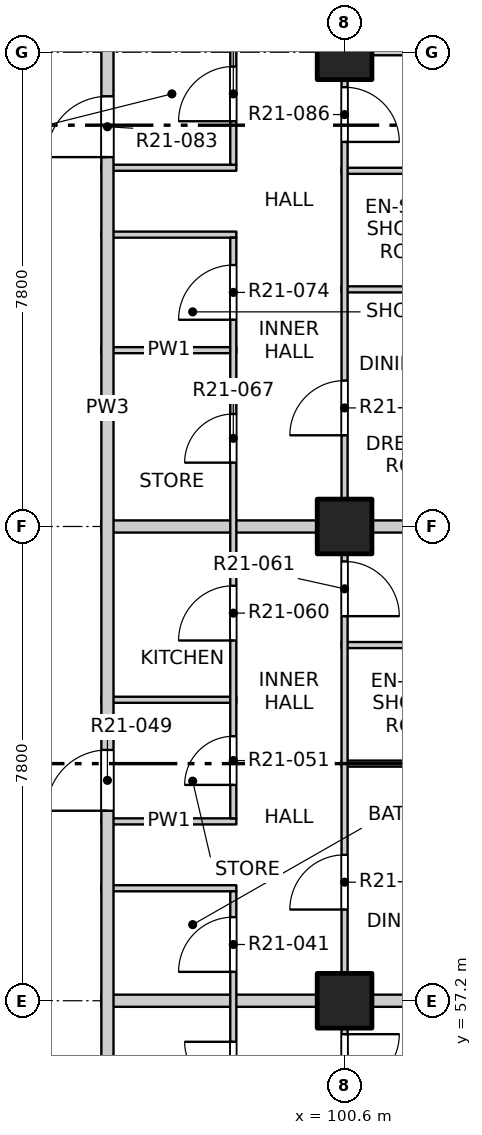
"""IFC4 building model, lengths in metres.
Left out: names, types, materials, properties, quantities, classifications, styles, units other than length and angle.
Written with IfcOpenShell. Run it as: python <this file> out.ifc"""

import sys

from ifc_helpers import new_model, si_unit, direction, frame, frame_2d, origin, origin_2d, place, context, subcontext, project, spatial, rectangle, extrude, element, fill, save


model = new_model("IFC4")
c1 = context("Model", 3, precision=1e-05, world=origin(), true_north=direction((0.0, 1.0)))
c2 = subcontext(c1, "Body", "Model", "MODEL_VIEW")
j1 = project(units=[si_unit("LENGTHUNIT", "METRE"), si_unit("PLANEANGLEUNIT", "RADIAN")], contexts=[c1])
p1 = place(None, origin())
s1 = spatial("IfcSite", under=j1, at=p1, CompositionType="ELEMENT")
p2 = place(p1, origin())
s2 = spatial("IfcBuilding", under=s1, at=p2, CompositionType="ELEMENT")
p3 = place(p2, frame((0.0, 0.0, 214.3)))
s3 = spatial("IfcBuildingStorey", under=s2, at=p3, CompositionType="ELEMENT", Elevation=214.3)
for number, where, z_axis, x_axis in (
    (1, (100.6, 57.2, -0.25), (0.0, 0.0, 1.0), (1.0, 0.0, 0.0)),
    (2, (100.6, 65.0, -0.25), (0.0, 0.0, 1.0), (1.0, 0.0, 0.0)),
    (3, (100.6, 72.8, -0.25), (0.0, 0.0, 1.0), (1.0, 0.0, 0.0)),
):
    element("IfcColumn", number, at=place(p3, frame(where, z_axis=z_axis, x_axis=x_axis)), inside=s3, PredefinedType="COLUMN", context=c2, shape_type="SweptSolid", body=[
        extrude(rectangle(XDim=0.9, YDim=0.9, at=origin_2d()), origin(), (0.0, 0.0, 1.0), 3.4),
    ])
p4 = place(p3, frame((96.6, 57.2, 0.0), z_axis=(0.0, 0.0, 1.0), x_axis=(1.0, 0.0, 0.0)))
e4 = element("IfcWall", 4, at=p4, inside=s3, PredefinedType="PARTITIONING", context=c2, shape_type="SweptSolid", body=[
    extrude(rectangle(XDim=11.5, YDim=0.2, at=frame_2d((5.75, 0.0))), origin(), (0.0, 0.0, 1.0), 3.15),
])
for number, where, z_axis, x_axis in (
    (5, (96.6, 59.05, 0.0), (0.0, 0.0, 1.0), (1.0, 0.0, 0.0)),
    (6, (96.6, 60.15, 0.0), (0.0, 0.0, 1.0), (1.0, 0.0, 0.0)),
):
    element("IfcWall", number, at=place(p3, frame(where, z_axis=z_axis, x_axis=x_axis)), inside=s3, PredefinedType="PARTITIONING", context=c2, shape_type="SweptSolid", body=[
        extrude(rectangle(XDim=2.22, YDim=0.1, at=frame_2d((1.11, 0.0))), origin(), (0.0, 0.0, 1.0), 3.15),
    ])
p5 = place(p3, frame((100.55, 61.1, 0.0), z_axis=(0.0, 0.0, 1.0), x_axis=(1.0, 0.0, 0.0)))
e7 = element("IfcWall", 7, at=p5, inside=s3, PredefinedType="PARTITIONING", context=c2, shape_type="SweptSolid", body=[
    extrude(rectangle(XDim=7.55, YDim=0.1, at=frame_2d((3.775, 0.0))), origin(), (0.0, 0.0, 1.0), 2.55),
])
p6 = place(p3, frame((96.6, 62.15, 0.0), z_axis=(0.0, 0.0, 1.0), x_axis=(1.0, 0.0, 0.0)))
e8 = element("IfcWall", 8, at=p6, inside=s3, PredefinedType="PARTITIONING", context=c2, shape_type="SweptSolid", body=[
    extrude(rectangle(XDim=2.22, YDim=0.1, at=frame_2d((1.11, 0.0))), origin(), (0.0, 0.0, 1.0), 3.15),
])
p7 = place(p3, frame((100.55, 63.05, 0.0), z_axis=(0.0, 0.0, 1.0), x_axis=(1.0, 0.0, 0.0)))
e9 = element("IfcWall", 9, at=p7, inside=s3, PredefinedType="PARTITIONING", context=c2, shape_type="SweptSolid", body=[
    extrude(rectangle(XDim=3.7, YDim=0.1, at=frame_2d((1.85, 0.0))), origin(), (0.0, 0.0, 1.0), 3.15),
])
p8 = place(p3, frame((96.6, 65.0, 0.0), z_axis=(0.0, 0.0, 1.0), x_axis=(1.0, 0.0, 0.0)))
e10 = element("IfcWall", 10, at=p8, inside=s3, PredefinedType="PARTITIONING", context=c2, shape_type="SweptSolid", body=[
    extrude(rectangle(XDim=11.5, YDim=0.2, at=frame_2d((5.75, 0.0))), origin(), (0.0, 0.0, 1.0), 3.15),
])
p9 = place(p3, frame((96.6, 67.9, 0.0), z_axis=(0.0, 0.0, 1.0), x_axis=(1.0, 0.0, 0.0)))
e11 = element("IfcWall", 11, at=p9, inside=s3, PredefinedType="PARTITIONING", context=c2, shape_type="SweptSolid", body=[
    extrude(rectangle(XDim=2.22, YDim=0.1, at=frame_2d((1.11, 0.0))), origin(), (0.0, 0.0, 1.0), 3.15),
])
p10 = place(p3, frame((100.55, 68.9, 0.0), z_axis=(0.0, 0.0, 1.0), x_axis=(1.0, 0.0, 0.0)))
e12 = element("IfcWall", 12, at=p10, inside=s3, PredefinedType="PARTITIONING", context=c2, shape_type="SweptSolid", body=[
    extrude(rectangle(XDim=7.55, YDim=0.1, at=frame_2d((3.775, 0.0))), origin(), (0.0, 0.0, 1.0), 2.55),
])
p11 = place(p3, frame((96.6, 69.8, 0.0), z_axis=(0.0, 0.0, 1.0), x_axis=(1.0, 0.0, 0.0)))
e13 = element("IfcWall", 13, at=p11, inside=s3, PredefinedType="PARTITIONING", context=c2, shape_type="SweptSolid", body=[
    extrude(rectangle(XDim=2.22, YDim=0.1, at=frame_2d((1.11, 0.0))), origin(), (0.0, 0.0, 1.0), 3.15),
])
p12 = place(p3, frame((100.55, 70.85, 0.0), z_axis=(0.0, 0.0, 1.0), x_axis=(1.0, 0.0, 0.0)))
e14 = element("IfcWall", 14, at=p12, inside=s3, PredefinedType="PARTITIONING", context=c2, shape_type="SweptSolid", body=[
    extrude(rectangle(XDim=3.4, YDim=0.1, at=frame_2d((1.7, 0.0))), origin(), (0.0, 0.0, 1.0), 3.15),
])
p13 = place(p3, frame((96.6, 70.9, 0.0), z_axis=(0.0, 0.0, 1.0), x_axis=(1.0, 0.0, 0.0)))
e15 = element("IfcWall", 15, at=p13, inside=s3, PredefinedType="PARTITIONING", context=c2, shape_type="SweptSolid", body=[
    extrude(rectangle(XDim=2.22, YDim=0.1, at=frame_2d((1.11, 0.0))), origin(), (0.0, 0.0, 1.0), 3.15),
])
p14 = place(p3, frame((100.55, 72.8, 0.0), z_axis=(0.0, 0.0, 1.0), x_axis=(1.0, 0.0, 0.0)))
e16 = element("IfcWall", 16, at=p14, inside=s3, PredefinedType="PARTITIONING", context=c2, shape_type="SweptSolid", body=[
    extrude(rectangle(XDim=7.55, YDim=0.1, at=frame_2d((3.775, 0.0))), origin(), (0.0, 0.0, 1.0), 3.15),
])
p15 = place(p3, frame((96.7, 49.5, 0.0), z_axis=(0.0, 0.0, 1.0), x_axis=(0.0, 1.0, 0.0)))
e17 = element("IfcWall", 17, at=p15, inside=s3, PredefinedType="PARTITIONING", context=c2, shape_type="SweptSolid", body=[
    extrude(rectangle(XDim=34.9, YDim=0.2, at=frame_2d((17.45, 0.0))), origin(), (0.0, 0.0, 1.0), 3.15),
])
p16 = place(p15, frame((3.275, 0.0, 0.0)))
e18 = element("IfcOpeningElement", 18, at=p16, cuts=e17, PredefinedType="OPENING", context=c2, shape_type="SweptSolid", body=[
    extrude(rectangle(XDim=1.0, YDim=2.1, at=frame_2d((0.5, 1.05))), frame((0.0, 0.11, 0.0), z_axis=(0.0, -1.0, 0.0), x_axis=(1.0, 0.0, 0.0)), (0.0, 0.0, 1.0), 0.22),
])
p17 = place(p15, frame((10.825, 0.0, 0.0)))
e19 = element("IfcOpeningElement", 19, at=p17, cuts=e17, PredefinedType="OPENING", context=c2, shape_type="SweptSolid", body=[
    extrude(rectangle(XDim=1.0, YDim=2.1, at=frame_2d((0.5, 1.05))), frame((0.0, 0.11, 0.0), z_axis=(0.0, -1.0, 0.0), x_axis=(1.0, 0.0, 0.0)), (0.0, 0.0, 1.0), 0.22),
])
p18 = place(p15, frame((21.575, 0.0, 0.0)))
e20 = element("IfcOpeningElement", 20, at=p18, cuts=e17, PredefinedType="OPENING", context=c2, shape_type="SweptSolid", body=[
    extrude(rectangle(XDim=1.0, YDim=2.1, at=frame_2d((0.5, 1.05))), frame((0.0, 0.11, 0.0), z_axis=(0.0, -1.0, 0.0), x_axis=(1.0, 0.0, 0.0)), (0.0, 0.0, 1.0), 0.22),
])
p19 = place(p15, frame((30.575, 0.0, 0.0)))
e21 = element("IfcOpeningElement", 21, at=p19, cuts=e17, PredefinedType="OPENING", context=c2, shape_type="SweptSolid", body=[
    extrude(rectangle(XDim=1.0, YDim=2.1, at=frame_2d((0.5, 1.05))), frame((0.0, 0.11, 0.0), z_axis=(0.0, -1.0, 0.0), x_axis=(1.0, 0.0, 0.0)), (0.0, 0.0, 1.0), 0.22),
])
p20 = place(p3, frame((98.77, 55.1, 0.0), z_axis=(0.0, 0.0, 1.0), x_axis=(0.0, 1.0, 0.0)))
e22 = element("IfcWall", 22, at=p20, inside=s3, PredefinedType="PARTITIONING", context=c2, shape_type="SweptSolid", body=[
    extrude(rectangle(XDim=3.9, YDim=0.1, at=frame_2d((1.95, 0.0))), origin(), (0.0, 0.0, 1.0), 3.15),
])
p21 = place(p20, frame((0.625, 0.0, 0.0)))
e23 = element("IfcOpeningElement", 23, at=p21, cuts=e22, PredefinedType="OPENING", context=c2, shape_type="SweptSolid", body=[
    extrude(rectangle(XDim=0.8, YDim=2.1, at=frame_2d((0.4, 1.05))), frame((0.0, 0.06, 0.0), z_axis=(0.0, -1.0, 0.0), x_axis=(1.0, 0.0, 0.0)), (0.0, 0.0, 1.0), 0.12),
])
p22 = place(p20, frame((2.575, 0.0, 0.0)))
e24 = element("IfcOpeningElement", 24, at=p22, cuts=e22, PredefinedType="OPENING", context=c2, shape_type="SweptSolid", body=[
    extrude(rectangle(XDim=0.9, YDim=2.1, at=frame_2d((0.45, 1.05))), frame((0.0, 0.06, 0.0), z_axis=(0.0, -1.0, 0.0), x_axis=(1.0, 0.0, 0.0)), (0.0, 0.0, 1.0), 0.12),
])
p23 = place(p3, frame((98.77, 60.2, 0.0), z_axis=(0.0, 0.0, 1.0), x_axis=(0.0, 1.0, 0.0)))
e25 = element("IfcWall", 25, at=p23, inside=s3, PredefinedType="PARTITIONING", context=c2, shape_type="SweptSolid", body=[
    extrude(rectangle(XDim=9.55, YDim=0.1, at=frame_2d((4.775, 0.0))), origin(), (0.0, 0.0, 1.0), 3.15),
])
p24 = place(p23, frame((0.55, 0.0, 0.0)))
e26 = element("IfcOpeningElement", 26, at=p24, cuts=e25, PredefinedType="OPENING", context=c2, shape_type="SweptSolid", body=[
    extrude(rectangle(XDim=0.8, YDim=2.1, at=frame_2d((0.4, 1.05))), frame((0.0, 0.06, 0.0), z_axis=(0.0, -1.0, 0.0), x_axis=(1.0, 0.0, 0.0)), (0.0, 0.0, 1.0), 0.12),
])
p25 = place(p23, frame((2.925, 0.0, 0.0)))
e27 = element("IfcOpeningElement", 27, at=p25, cuts=e25, PredefinedType="OPENING", context=c2, shape_type="SweptSolid", body=[
    extrude(rectangle(XDim=0.9, YDim=2.1, at=frame_2d((0.45, 1.05))), frame((0.0, 0.06, 0.0), z_axis=(0.0, -1.0, 0.0), x_axis=(1.0, 0.0, 0.0)), (0.0, 0.0, 1.0), 0.12),
])
p26 = place(p23, frame((5.85, 0.0, 0.0)))
e28 = element("IfcOpeningElement", 28, at=p26, cuts=e25, PredefinedType="OPENING", context=c2, shape_type="SweptSolid", body=[
    extrude(rectangle(XDim=0.8, YDim=2.1, at=frame_2d((0.4, 1.05))), frame((0.0, 0.06, 0.0), z_axis=(0.0, -1.0, 0.0), x_axis=(1.0, 0.0, 0.0)), (0.0, 0.0, 1.0), 0.12),
])
p27 = place(p23, frame((8.2, 0.0, 0.0)))
e29 = element("IfcOpeningElement", 29, at=p27, cuts=e25, PredefinedType="OPENING", context=c2, shape_type="SweptSolid", body=[
    extrude(rectangle(XDim=0.9, YDim=2.1, at=frame_2d((0.45, 1.05))), frame((0.0, 0.06, 0.0), z_axis=(0.0, -1.0, 0.0), x_axis=(1.0, 0.0, 0.0)), (0.0, 0.0, 1.0), 0.12),
])
p28 = place(p3, frame((98.77, 70.95, 0.0), z_axis=(0.0, 0.0, 1.0), x_axis=(0.0, 1.0, 0.0)))
e30 = element("IfcWall", 30, at=p28, inside=s3, PredefinedType="PARTITIONING", context=c2, shape_type="SweptSolid", body=[
    extrude(rectangle(XDim=7.8, YDim=0.1, at=frame_2d((3.9, 0.0))), origin(), (0.0, 0.0, 1.0), 3.15),
])
p29 = place(p28, frame((0.715, 0.0, 0.0)))
e31 = element("IfcOpeningElement", 31, at=p29, cuts=e30, PredefinedType="OPENING", context=c2, shape_type="SweptSolid", body=[
    extrude(rectangle(XDim=0.9, YDim=2.1, at=frame_2d((0.45, 1.05))), frame((0.0, 0.06, 0.0), z_axis=(0.0, -1.0, 0.0), x_axis=(1.0, 0.0, 0.0)), (0.0, 0.0, 1.0), 0.12),
])
p30 = place(p28, frame((3.615, 0.0, 0.0)))
e32 = element("IfcOpeningElement", 32, at=p30, cuts=e30, PredefinedType="OPENING", context=c2, shape_type="SweptSolid", body=[
    extrude(rectangle(XDim=0.9, YDim=2.1, at=frame_2d((0.45, 1.05))), frame((0.0, 0.06, 0.0), z_axis=(0.0, -1.0, 0.0), x_axis=(1.0, 0.0, 0.0)), (0.0, 0.0, 1.0), 0.12),
])
p31 = place(p28, frame((6.35, 0.0, 0.0)))
e33 = element("IfcOpeningElement", 33, at=p31, cuts=e30, PredefinedType="OPENING", context=c2, shape_type="SweptSolid", body=[
    extrude(rectangle(XDim=0.9, YDim=2.1, at=frame_2d((0.45, 1.05))), frame((0.0, 0.06, 0.0), z_axis=(0.0, -1.0, 0.0), x_axis=(1.0, 0.0, 0.0)), (0.0, 0.0, 1.0), 0.12),
])
p32 = place(p3, frame((100.6, 41.9, 0.0), z_axis=(0.0, 0.0, 1.0), x_axis=(0.0, 1.0, 0.0)))
e34 = element("IfcWall", 34, at=p32, inside=s3, PredefinedType="PARTITIONING", context=c2, shape_type="SweptSolid", body=[
    extrude(rectangle(XDim=46.2, YDim=0.1, at=frame_2d((23.1, 0.0))), origin(), (0.0, 0.0, 1.0), 3.15),
])
p33 = place(p32, frame((1.2, 0.0, 0.0)))
e35 = element("IfcOpeningElement", 35, at=p33, cuts=e34, PredefinedType="OPENING", context=c2, shape_type="SweptSolid", body=[
    extrude(rectangle(XDim=0.9, YDim=2.1, at=frame_2d((0.45, 1.05))), frame((0.0, 0.06, 0.0), z_axis=(0.0, -1.0, 0.0), x_axis=(1.0, 0.0, 0.0)), (0.0, 0.0, 1.0), 0.12),
])
p34 = place(p32, frame((6.025, 0.0, 0.0)))
e36 = element("IfcOpeningElement", 36, at=p34, cuts=e34, PredefinedType="OPENING", context=c2, shape_type="SweptSolid", body=[
    extrude(rectangle(XDim=0.9, YDim=2.1, at=frame_2d((0.45, 1.05))), frame((0.0, 0.06, 0.0), z_axis=(0.0, -1.0, 0.0), x_axis=(1.0, 0.0, 0.0)), (0.0, 0.0, 1.0), 0.12),
])
p35 = place(p32, frame((9.0, 0.0, 0.0)))
e37 = element("IfcOpeningElement", 37, at=p35, cuts=e34, PredefinedType="OPENING", context=c2, shape_type="SweptSolid", body=[
    extrude(rectangle(XDim=0.9, YDim=2.1, at=frame_2d((0.45, 1.05))), frame((0.0, 0.06, 0.0), z_axis=(0.0, -1.0, 0.0), x_axis=(1.0, 0.0, 0.0)), (0.0, 0.0, 1.0), 0.12),
])
p36 = place(p32, frame((13.85, 0.0, 0.0)))
e38 = element("IfcOpeningElement", 38, at=p36, cuts=e34, PredefinedType="OPENING", context=c2, shape_type="SweptSolid", body=[
    extrude(rectangle(XDim=0.9, YDim=2.1, at=frame_2d((0.45, 1.05))), frame((0.0, 0.06, 0.0), z_axis=(0.0, -1.0, 0.0), x_axis=(1.0, 0.0, 0.0)), (0.0, 0.0, 1.0), 0.12),
])
p37 = place(p32, frame((16.8, 0.0, 0.0)))
e39 = element("IfcOpeningElement", 39, at=p37, cuts=e34, PredefinedType="OPENING", context=c2, shape_type="SweptSolid", body=[
    extrude(rectangle(XDim=0.9, YDim=2.1, at=frame_2d((0.45, 1.05))), frame((0.0, 0.06, 0.0), z_axis=(0.0, -1.0, 0.0), x_axis=(1.0, 0.0, 0.0)), (0.0, 0.0, 1.0), 0.12),
])
p38 = place(p32, frame((21.625, 0.0, 0.0)))
e40 = element("IfcOpeningElement", 40, at=p38, cuts=e34, PredefinedType="OPENING", context=c2, shape_type="SweptSolid", body=[
    extrude(rectangle(XDim=0.9, YDim=2.1, at=frame_2d((0.45, 1.05))), frame((0.0, 0.06, 0.0), z_axis=(0.0, -1.0, 0.0), x_axis=(1.0, 0.0, 0.0)), (0.0, 0.0, 1.0), 0.12),
])
p39 = place(p32, frame((24.6, 0.0, 0.0)))
e41 = element("IfcOpeningElement", 41, at=p39, cuts=e34, PredefinedType="OPENING", context=c2, shape_type="SweptSolid", body=[
    extrude(rectangle(XDim=0.9, YDim=2.1, at=frame_2d((0.45, 1.05))), frame((0.0, 0.06, 0.0), z_axis=(0.0, -1.0, 0.0), x_axis=(1.0, 0.0, 0.0)), (0.0, 0.0, 1.0), 0.12),
])
p40 = place(p32, frame((29.425, 0.0, 0.0)))
e42 = element("IfcOpeningElement", 42, at=p40, cuts=e34, PredefinedType="OPENING", context=c2, shape_type="SweptSolid", body=[
    extrude(rectangle(XDim=0.9, YDim=2.1, at=frame_2d((0.45, 1.05))), frame((0.0, 0.06, 0.0), z_axis=(0.0, -1.0, 0.0), x_axis=(1.0, 0.0, 0.0)), (0.0, 0.0, 1.0), 0.12),
])
p41 = place(p32, frame((33.375, 0.0, 0.0)))
e43 = element("IfcOpeningElement", 43, at=p41, cuts=e34, PredefinedType="OPENING", context=c2, shape_type="SweptSolid", body=[
    extrude(rectangle(XDim=0.9, YDim=2.1, at=frame_2d((0.45, 1.05))), frame((0.0, 0.06, 0.0), z_axis=(0.0, -1.0, 0.0), x_axis=(1.0, 0.0, 0.0)), (0.0, 0.0, 1.0), 0.12),
])
p42 = place(p32, frame((36.3, 0.0, 0.0)))
e44 = element("IfcOpeningElement", 44, at=p42, cuts=e34, PredefinedType="OPENING", context=c2, shape_type="SweptSolid", body=[
    extrude(rectangle(XDim=0.9, YDim=2.1, at=frame_2d((0.45, 1.05))), frame((0.0, 0.06, 0.0), z_axis=(0.0, -1.0, 0.0), x_axis=(1.0, 0.0, 0.0)), (0.0, 0.0, 1.0), 0.12),
])
p43 = place(p32, frame((41.175, 0.0, 0.0)))
e45 = element("IfcOpeningElement", 45, at=p43, cuts=e34, PredefinedType="OPENING", context=c2, shape_type="SweptSolid", body=[
    extrude(rectangle(XDim=0.9, YDim=2.1, at=frame_2d((0.45, 1.05))), frame((0.0, 0.06, 0.0), z_axis=(0.0, -1.0, 0.0), x_axis=(1.0, 0.0, 0.0)), (0.0, 0.0, 1.0), 0.12),
])
p44 = place(p32, frame((44.1, 0.0, 0.0)))
e46 = element("IfcOpeningElement", 46, at=p44, cuts=e34, PredefinedType="OPENING", context=c2, shape_type="SweptSolid", body=[
    extrude(rectangle(XDim=0.9, YDim=2.1, at=frame_2d((0.45, 1.05))), frame((0.0, 0.06, 0.0), z_axis=(0.0, -1.0, 0.0), x_axis=(1.0, 0.0, 0.0)), (0.0, 0.0, 1.0), 0.12),
])
p45 = place(p21, origin())
e47 = element("IfcDoor", 47, at=p45, inside=s3, OperationType="SINGLE_SWING_RIGHT", PredefinedType="DOOR", context=c2, shape_type="SweptSolid", body=[
    extrude(rectangle(XDim=0.8, YDim=2.1, at=frame_2d((0.4, 1.05))), frame((0.0, 0.025, 0.0), z_axis=(0.0, -1.0, 0.0), x_axis=(1.0, 0.0, 0.0)), (0.0, 0.0, 1.0), 0.05),
])
fill(e23, e47)
p46 = place(p36, origin())
e48 = element("IfcDoor", 48, at=p46, inside=s3, OperationType="SINGLE_SWING_LEFT", PredefinedType="DOOR", context=c2, shape_type="SweptSolid", body=[
    extrude(rectangle(XDim=0.9, YDim=2.1, at=frame_2d((0.45, 1.05))), frame((0.0, 0.025, 0.0), z_axis=(0.0, -1.0, 0.0), x_axis=(1.0, 0.0, 0.0)), (0.0, 0.0, 1.0), 0.05),
])
fill(e38, e48)
p47 = place(p22, origin())
e49 = element("IfcDoor", 49, at=p47, inside=s3, OperationType="SINGLE_SWING_LEFT", PredefinedType="DOOR", context=c2, shape_type="SweptSolid", body=[
    extrude(rectangle(XDim=0.9, YDim=2.1, at=frame_2d((0.45, 1.05))), frame((0.0, 0.025, 0.0), z_axis=(0.0, -1.0, 0.0), x_axis=(1.0, 0.0, 0.0)), (0.0, 0.0, 1.0), 0.05),
])
fill(e24, e49)
p48 = place(p37, origin())
e50 = element("IfcDoor", 50, at=p48, inside=s3, OperationType="SINGLE_SWING_LEFT", PredefinedType="DOOR", context=c2, shape_type="SweptSolid", body=[
    extrude(rectangle(XDim=0.9, YDim=2.1, at=frame_2d((0.45, 1.05))), frame((0.0, 0.025, 0.0), z_axis=(0.0, -1.0, 0.0), x_axis=(1.0, 0.0, 0.0)), (0.0, 0.0, 1.0), 0.05),
])
fill(e39, e50)
p49 = place(p17, origin())
e51 = element("IfcDoor", 51, at=p49, inside=s3, OperationType="SINGLE_SWING_LEFT", PredefinedType="DOOR", context=c2, shape_type="SweptSolid", body=[
    extrude(rectangle(XDim=1.0, YDim=2.1, at=frame_2d((0.5, 1.05))), frame((0.0, 0.025, 0.0), z_axis=(0.0, -1.0, 0.0), x_axis=(1.0, 0.0, 0.0)), (0.0, 0.0, 1.0), 0.05),
])
fill(e19, e51)
p50 = place(p24, origin())
e52 = element("IfcDoor", 52, at=p50, inside=s3, OperationType="SINGLE_SWING_LEFT", PredefinedType="DOOR", context=c2, shape_type="SweptSolid", body=[
    extrude(rectangle(XDim=0.8, YDim=2.1, at=frame_2d((0.4, 1.05))), frame((0.0, 0.025, 0.0), z_axis=(0.0, -1.0, 0.0), x_axis=(1.0, 0.0, 0.0)), (0.0, 0.0, 1.0), 0.05),
])
fill(e26, e52)
p51 = place(p25, origin())
e53 = element("IfcDoor", 53, at=p51, inside=s3, OperationType="SINGLE_SWING_LEFT", PredefinedType="DOOR", context=c2, shape_type="SweptSolid", body=[
    extrude(rectangle(XDim=0.9, YDim=2.1, at=frame_2d((0.45, 1.05))), frame((0.0, 0.025, 0.0), z_axis=(0.0, -1.0, 0.0), x_axis=(1.0, 0.0, 0.0)), (0.0, 0.0, 1.0), 0.05),
])
fill(e27, e53)
p52 = place(p38, origin())
e54 = element("IfcDoor", 54, at=p52, inside=s3, OperationType="SINGLE_SWING_RIGHT", PredefinedType="DOOR", context=c2, shape_type="SweptSolid", body=[
    extrude(rectangle(XDim=0.9, YDim=2.1, at=frame_2d((0.45, 1.05))), frame((0.0, 0.025, 0.0), z_axis=(0.0, -1.0, 0.0), x_axis=(1.0, 0.0, 0.0)), (0.0, 0.0, 1.0), 0.05),
])
fill(e40, e54)
p53 = place(p26, origin())
e55 = element("IfcDoor", 55, at=p53, inside=s3, OperationType="SINGLE_SWING_LEFT", PredefinedType="DOOR", context=c2, shape_type="SweptSolid", body=[
    extrude(rectangle(XDim=0.8, YDim=2.1, at=frame_2d((0.4, 1.05))), frame((0.0, 0.025, 0.0), z_axis=(0.0, -1.0, 0.0), x_axis=(1.0, 0.0, 0.0)), (0.0, 0.0, 1.0), 0.05),
])
fill(e28, e55)
p54 = place(p39, origin())
e56 = element("IfcDoor", 56, at=p54, inside=s3, OperationType="SINGLE_SWING_LEFT", PredefinedType="DOOR", context=c2, shape_type="SweptSolid", body=[
    extrude(rectangle(XDim=0.9, YDim=2.1, at=frame_2d((0.45, 1.05))), frame((0.0, 0.025, 0.0), z_axis=(0.0, -1.0, 0.0), x_axis=(1.0, 0.0, 0.0)), (0.0, 0.0, 1.0), 0.05),
])
fill(e41, e56)
p55 = place(p27, origin())
e57 = element("IfcDoor", 57, at=p55, inside=s3, OperationType="SINGLE_SWING_LEFT", PredefinedType="DOOR", context=c2, shape_type="SweptSolid", body=[
    extrude(rectangle(XDim=0.9, YDim=2.1, at=frame_2d((0.45, 1.05))), frame((0.0, 0.025, 0.0), z_axis=(0.0, -1.0, 0.0), x_axis=(1.0, 0.0, 0.0)), (0.0, 0.0, 1.0), 0.05),
])
fill(e29, e57)
p56 = place(p18, origin())
e58 = element("IfcDoor", 58, at=p56, inside=s3, OperationType="SINGLE_SWING_LEFT", PredefinedType="DOOR", context=c2, shape_type="SweptSolid", body=[
    extrude(rectangle(XDim=1.0, YDim=2.1, at=frame_2d((0.5, 1.05))), frame((0.0, 0.025, 0.0), z_axis=(0.0, -1.0, 0.0), x_axis=(1.0, 0.0, 0.0)), (0.0, 0.0, 1.0), 0.05),
])
fill(e20, e58)
p57 = place(p40, origin())
e59 = element("IfcDoor", 59, at=p57, inside=s3, OperationType="SINGLE_SWING_RIGHT", PredefinedType="DOOR", context=c2, shape_type="SweptSolid", body=[
    extrude(rectangle(XDim=0.9, YDim=2.1, at=frame_2d((0.45, 1.05))), frame((0.0, 0.025, 0.0), z_axis=(0.0, -1.0, 0.0), x_axis=(1.0, 0.0, 0.0)), (0.0, 0.0, 1.0), 0.05),
])
fill(e42, e59)
p58 = place(p29, origin())
e60 = element("IfcDoor", 60, at=p58, inside=s3, OperationType="SINGLE_SWING_LEFT", PredefinedType="DOOR", context=c2, shape_type="SweptSolid", body=[
    extrude(rectangle(XDim=0.9, YDim=2.1, at=frame_2d((0.45, 1.05))), frame((0.0, 0.025, 0.0), z_axis=(0.0, -1.0, 0.0), x_axis=(1.0, 0.0, 0.0)), (0.0, 0.0, 1.0), 0.05),
])
fill(e31, e60)
save(model, sys.argv[1])
